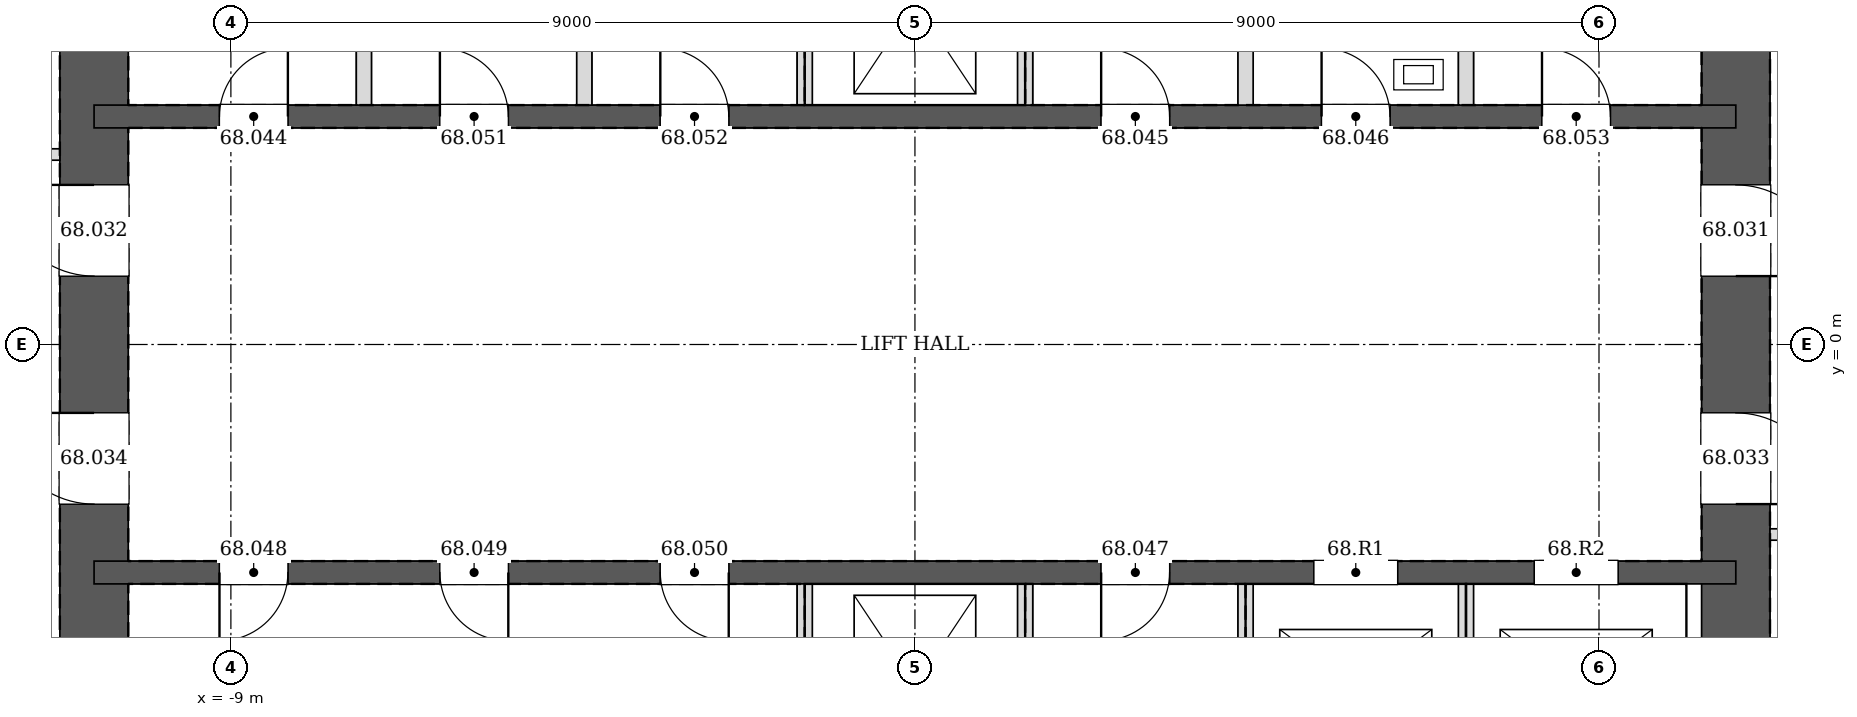
"""IFC4 building model, lengths in metres.
Left out: names, types, materials, properties, quantities, classifications, styles, units other than length and angle.
Written with IfcOpenShell. Run it as: python <this file> out.ifc"""

import sys

from ifc_helpers import new_model, si_unit, direction, frame, frame_2d, origin, place, context, subcontext, project, spatial, rectangle, extrude, element, fill, save


model = new_model("IFC4")
c1 = context("Model", 3, precision=1e-05, world=origin(), true_north=direction((0.0, 1.0)))
c2 = subcontext(c1, "Body", "Model", "MODEL_VIEW")
j1 = project(units=[si_unit("LENGTHUNIT", "METRE"), si_unit("PLANEANGLEUNIT", "RADIAN")], contexts=[c1])
p1 = place(None, origin())
s1 = spatial("IfcSite", under=j1, at=p1, CompositionType="ELEMENT")
p2 = place(p1, origin())
s2 = spatial("IfcBuilding", under=s1, at=p2, CompositionType="ELEMENT")
p3 = place(p2, frame((0.0, 0.0, 281.0)))
s3 = spatial("IfcBuildingStorey", under=s2, at=p3, CompositionType="ELEMENT", Elevation=281.0)
p4 = place(p3, frame((10.8, -10.8, 0.0), z_axis=(0.0, 0.0, 1.0), x_axis=(0.0, 1.0, 0.0)))
e1 = element("IfcWall", 1, at=p4, inside=s3, PredefinedType="SOLIDWALL", context=c2, shape_type="SweptSolid", body=[
    extrude(rectangle(XDim=21.6, YDim=0.9, at=frame_2d((10.8, 0.0))), origin(), (0.0, 0.0, 1.0), 3.4),
])
p5 = place(p4, frame((11.7, 0.0, 0.0)))
e2 = element("IfcOpeningElement", 2, at=p5, cuts=e1, PredefinedType="OPENING", context=c2, shape_type="SweptSolid", body=[
    extrude(rectangle(XDim=1.2, YDim=2.1, at=frame_2d((0.6, 1.05))), frame((0.0, 0.46, 0.0), z_axis=(0.0, -1.0, 0.0), x_axis=(1.0, 0.0, 0.0)), (0.0, 0.0, 1.0), 0.92),
])
p6 = place(p4, frame((8.7, 0.0, 0.0)))
e3 = element("IfcOpeningElement", 3, at=p6, cuts=e1, PredefinedType="OPENING", context=c2, shape_type="SweptSolid", body=[
    extrude(rectangle(XDim=1.2, YDim=2.1, at=frame_2d((0.6, 1.05))), frame((0.0, 0.46, 0.0), z_axis=(0.0, -1.0, 0.0), x_axis=(1.0, 0.0, 0.0)), (0.0, 0.0, 1.0), 0.92),
])
p7 = place(p3, frame((-10.8, 10.8, 0.0), z_axis=(0.0, 0.0, 1.0), x_axis=(0.0, -1.0, 0.0)))
e4 = element("IfcWall", 4, at=p7, inside=s3, PredefinedType="SOLIDWALL", context=c2, shape_type="SweptSolid", body=[
    extrude(rectangle(XDim=21.6, YDim=0.9, at=frame_2d((10.8, 0.0))), origin(), (0.0, 0.0, 1.0), 3.4),
])
p8 = place(p7, frame((8.7, 0.0, 0.0)))
e5 = element("IfcOpeningElement", 5, at=p8, cuts=e4, PredefinedType="OPENING", context=c2, shape_type="SweptSolid", body=[
    extrude(rectangle(XDim=1.2, YDim=2.1, at=frame_2d((0.6, 1.05))), frame((0.0, 0.46, 0.0), z_axis=(0.0, -1.0, 0.0), x_axis=(1.0, 0.0, 0.0)), (0.0, 0.0, 1.0), 0.92),
])
p9 = place(p7, frame((11.7, 0.0, 0.0)))
e6 = element("IfcOpeningElement", 6, at=p9, cuts=e4, PredefinedType="OPENING", context=c2, shape_type="SweptSolid", body=[
    extrude(rectangle(XDim=1.2, YDim=2.1, at=frame_2d((0.6, 1.05))), frame((0.0, 0.46, 0.0), z_axis=(0.0, -1.0, 0.0), x_axis=(1.0, 0.0, 0.0)), (0.0, 0.0, 1.0), 0.92),
])
p10 = place(p3, frame((-10.8, 3.0, 0.0), z_axis=(0.0, 0.0, 1.0), x_axis=(1.0, 0.0, 0.0)))
e7 = element("IfcWall", 7, at=p10, inside=s3, PredefinedType="SOLIDWALL", context=c2, shape_type="SweptSolid", body=[
    extrude(rectangle(XDim=21.6, YDim=0.3, at=frame_2d((10.8, 0.0))), origin(), (0.0, 0.0, 1.0), 3.4),
])
p11 = place(p10, frame((1.65, 0.0, 0.0)))
e8 = element("IfcOpeningElement", 8, at=p11, cuts=e7, PredefinedType="OPENING", context=c2, shape_type="SweptSolid", body=[
    extrude(rectangle(XDim=0.9, YDim=2.1, at=frame_2d((0.45, 1.05))), frame((0.0, 0.16, 0.0), z_axis=(0.0, -1.0, 0.0), x_axis=(1.0, 0.0, 0.0)), (0.0, 0.0, 1.0), 0.32),
])
p12 = place(p10, frame((13.25, 0.0, 0.0)))
e9 = element("IfcOpeningElement", 9, at=p12, cuts=e7, PredefinedType="OPENING", context=c2, shape_type="SweptSolid", body=[
    extrude(rectangle(XDim=0.9, YDim=2.1, at=frame_2d((0.45, 1.05))), frame((0.0, 0.16, 0.0), z_axis=(0.0, -1.0, 0.0), x_axis=(1.0, 0.0, 0.0)), (0.0, 0.0, 1.0), 0.32),
])
p13 = place(p10, frame((16.15, 0.0, 0.0)))
e10 = element("IfcOpeningElement", 10, at=p13, cuts=e7, PredefinedType="OPENING", context=c2, shape_type="SweptSolid", body=[
    extrude(rectangle(XDim=0.9, YDim=2.1, at=frame_2d((0.45, 1.05))), frame((0.0, 0.16, 0.0), z_axis=(0.0, -1.0, 0.0), x_axis=(1.0, 0.0, 0.0)), (0.0, 0.0, 1.0), 0.32),
])
p14 = place(p10, frame((4.55, 0.0, 0.0)))
e11 = element("IfcOpeningElement", 11, at=p14, cuts=e7, PredefinedType="OPENING", context=c2, shape_type="SweptSolid", body=[
    extrude(rectangle(XDim=0.9, YDim=2.1, at=frame_2d((0.45, 1.05))), frame((0.0, 0.16, 0.0), z_axis=(0.0, -1.0, 0.0), x_axis=(1.0, 0.0, 0.0)), (0.0, 0.0, 1.0), 0.32),
])
p15 = place(p10, frame((7.45, 0.0, 0.0)))
e12 = element("IfcOpeningElement", 12, at=p15, cuts=e7, PredefinedType="OPENING", context=c2, shape_type="SweptSolid", body=[
    extrude(rectangle(XDim=0.9, YDim=2.1, at=frame_2d((0.45, 1.05))), frame((0.0, 0.16, 0.0), z_axis=(0.0, -1.0, 0.0), x_axis=(1.0, 0.0, 0.0)), (0.0, 0.0, 1.0), 0.32),
])
p16 = place(p10, frame((19.05, 0.0, 0.0)))
e13 = element("IfcOpeningElement", 13, at=p16, cuts=e7, PredefinedType="OPENING", context=c2, shape_type="SweptSolid", body=[
    extrude(rectangle(XDim=0.9, YDim=2.1, at=frame_2d((0.45, 1.05))), frame((0.0, 0.16, 0.0), z_axis=(0.0, -1.0, 0.0), x_axis=(1.0, 0.0, 0.0)), (0.0, 0.0, 1.0), 0.32),
])
p17 = place(p3, frame((-10.8, -3.0, 0.0), z_axis=(0.0, 0.0, 1.0), x_axis=(1.0, 0.0, 0.0)))
e14 = element("IfcWall", 14, at=p17, inside=s3, PredefinedType="SOLIDWALL", context=c2, shape_type="SweptSolid", body=[
    extrude(rectangle(XDim=21.6, YDim=0.3, at=frame_2d((10.8, 0.0))), origin(), (0.0, 0.0, 1.0), 3.4),
])
p18 = place(p17, frame((13.25, 0.0, 0.0)))
e15 = element("IfcOpeningElement", 15, at=p18, cuts=e14, PredefinedType="OPENING", context=c2, shape_type="SweptSolid", body=[
    extrude(rectangle(XDim=0.9, YDim=2.1, at=frame_2d((0.45, 1.05))), frame((0.0, 0.16, 0.0), z_axis=(0.0, -1.0, 0.0), x_axis=(1.0, 0.0, 0.0)), (0.0, 0.0, 1.0), 0.32),
])
p19 = place(p17, frame((1.65, 0.0, 0.0)))
e16 = element("IfcOpeningElement", 16, at=p19, cuts=e14, PredefinedType="OPENING", context=c2, shape_type="SweptSolid", body=[
    extrude(rectangle(XDim=0.9, YDim=2.1, at=frame_2d((0.45, 1.05))), frame((0.0, 0.16, 0.0), z_axis=(0.0, -1.0, 0.0), x_axis=(1.0, 0.0, 0.0)), (0.0, 0.0, 1.0), 0.32),
])
p20 = place(p17, frame((4.55, 0.0, 0.0)))
e17 = element("IfcOpeningElement", 17, at=p20, cuts=e14, PredefinedType="OPENING", context=c2, shape_type="SweptSolid", body=[
    extrude(rectangle(XDim=0.9, YDim=2.1, at=frame_2d((0.45, 1.05))), frame((0.0, 0.16, 0.0), z_axis=(0.0, -1.0, 0.0), x_axis=(1.0, 0.0, 0.0)), (0.0, 0.0, 1.0), 0.32),
])
p21 = place(p17, frame((7.45, 0.0, 0.0)))
e18 = element("IfcOpeningElement", 18, at=p21, cuts=e14, PredefinedType="OPENING", context=c2, shape_type="SweptSolid", body=[
    extrude(rectangle(XDim=0.9, YDim=2.1, at=frame_2d((0.45, 1.05))), frame((0.0, 0.16, 0.0), z_axis=(0.0, -1.0, 0.0), x_axis=(1.0, 0.0, 0.0)), (0.0, 0.0, 1.0), 0.32),
])
p22 = place(p17, frame((16.05, 0.0, 0.0)))
e19 = element("IfcOpeningElement", 19, at=p22, cuts=e14, PredefinedType="OPENING", context=c2, shape_type="SweptSolid", body=[
    extrude(rectangle(XDim=1.1, YDim=2.1, at=frame_2d((0.55, 1.05))), frame((0.0, 0.16, 0.0), z_axis=(0.0, -1.0, 0.0), x_axis=(1.0, 0.0, 0.0)), (0.0, 0.0, 1.0), 0.32),
])
p23 = place(p17, frame((18.95, 0.0, 0.0)))
e20 = element("IfcOpeningElement", 20, at=p23, cuts=e14, PredefinedType="OPENING", context=c2, shape_type="SweptSolid", body=[
    extrude(rectangle(XDim=1.1, YDim=2.1, at=frame_2d((0.55, 1.05))), frame((0.0, 0.16, 0.0), z_axis=(0.0, -1.0, 0.0), x_axis=(1.0, 0.0, 0.0)), (0.0, 0.0, 1.0), 0.32),
])
for number, where, z_axis, x_axis in (
    (21, (11.25, -2.5, 0.0), (0.0, 0.0, 1.0), (1.0, 0.0, 0.0)),
    (22, (-11.25, 2.5, 0.0), (0.0, 0.0, 1.0), (-1.0, 0.0, 0.0)),
):
    element("IfcWall", number, at=place(p3, frame(where, z_axis=z_axis, x_axis=x_axis)), inside=s3, PredefinedType="PARTITIONING", context=c2, shape_type="SweptSolid", body=[
        extrude(rectangle(XDim=1.8, YDim=0.15, at=frame_2d((0.9, 0.0))), origin(), (0.0, 0.0, 1.0), 3.2),
    ])
for number, where, z_axis, x_axis in (
    (23, (-7.25, 3.15, 0.0), (0.0, 0.0, 1.0), (0.0, 1.0, 0.0)),
    (24, (-4.35, 3.15, 0.0), (0.0, 0.0, 1.0), (0.0, 1.0, 0.0)),
    (25, (-1.45, 3.15, 0.0), (0.0, 0.0, 1.0), (0.0, 1.0, 0.0)),
    (26, (1.45, 3.15, 0.0), (0.0, 0.0, 1.0), (0.0, 1.0, 0.0)),
    (27, (4.35, 3.15, 0.0), (0.0, 0.0, 1.0), (0.0, 1.0, 0.0)),
    (28, (7.25, 3.15, 0.0), (0.0, 0.0, 1.0), (0.0, 1.0, 0.0)),
    (29, (-1.45, -5.85, 0.0), (0.0, 0.0, 1.0), (0.0, 1.0, 0.0)),
    (30, (1.45, -5.85, 0.0), (0.0, 0.0, 1.0), (0.0, 1.0, 0.0)),
    (31, (4.35, -5.85, 0.0), (0.0, 0.0, 1.0), (0.0, 1.0, 0.0)),
):
    element("IfcWall", number, at=place(p3, frame(where, z_axis=z_axis, x_axis=x_axis)), inside=s3, PredefinedType="PARTITIONING", context=c2, shape_type="SweptSolid", body=[
        extrude(rectangle(XDim=2.7, YDim=0.2, at=frame_2d((1.35, 0.0))), origin(), (0.0, 0.0, 1.0), 3.2),
    ])
p24 = place(p3, frame((7.25, -5.85, 0.0), z_axis=(0.0, 0.0, 1.0), x_axis=(0.0, 1.0, 0.0)))
e32 = element("IfcWall", 32, at=p24, inside=s3, PredefinedType="PARTITIONING", context=c2, shape_type="SweptSolid", body=[
    extrude(rectangle(XDim=2.7, YDim=0.2, at=frame_2d((1.35, 0.0))), origin(), (0.0, 0.0, 1.0), 3.4),
])
p25 = place(p5, frame((1.2, 0.0, 0.0), z_axis=(0.0, 0.0, 1.0), x_axis=(-1.0, 0.0, 0.0)))
e33 = element("IfcDoor", 33, at=p25, inside=s3, OperationType="SINGLE_SWING_RIGHT", PredefinedType="DOOR", context=c2, shape_type="SweptSolid", body=[
    extrude(rectangle(XDim=1.2, YDim=2.1, at=frame_2d((0.6, 1.05))), frame((0.0, 0.025, 0.0), z_axis=(0.0, -1.0, 0.0), x_axis=(1.0, 0.0, 0.0)), (0.0, 0.0, 1.0), 0.05),
])
fill(e2, e33)
p26 = place(p8, frame((1.2, 0.0, 0.0), z_axis=(0.0, 0.0, 1.0), x_axis=(-1.0, 0.0, 0.0)))
e34 = element("IfcDoor", 34, at=p26, inside=s3, OperationType="SINGLE_SWING_RIGHT", PredefinedType="DOOR", context=c2, shape_type="SweptSolid", body=[
    extrude(rectangle(XDim=1.2, YDim=2.1, at=frame_2d((0.6, 1.05))), frame((0.0, 0.025, 0.0), z_axis=(0.0, -1.0, 0.0), x_axis=(1.0, 0.0, 0.0)), (0.0, 0.0, 1.0), 0.05),
])
fill(e5, e34)
p27 = place(p6, frame((1.2, 0.0, 0.0), z_axis=(0.0, 0.0, 1.0), x_axis=(-1.0, 0.0, 0.0)))
e35 = element("IfcDoor", 35, at=p27, inside=s3, OperationType="SINGLE_SWING_RIGHT", PredefinedType="DOOR", context=c2, shape_type="SweptSolid", body=[
    extrude(rectangle(XDim=1.2, YDim=2.1, at=frame_2d((0.6, 1.05))), frame((0.0, 0.025, 0.0), z_axis=(0.0, -1.0, 0.0), x_axis=(1.0, 0.0, 0.0)), (0.0, 0.0, 1.0), 0.05),
])
fill(e3, e35)
p28 = place(p9, frame((1.2, 0.0, 0.0), z_axis=(0.0, 0.0, 1.0), x_axis=(-1.0, 0.0, 0.0)))
e36 = element("IfcDoor", 36, at=p28, inside=s3, OperationType="SINGLE_SWING_RIGHT", PredefinedType="DOOR", context=c2, shape_type="SweptSolid", body=[
    extrude(rectangle(XDim=1.2, YDim=2.1, at=frame_2d((0.6, 1.05))), frame((0.0, 0.025, 0.0), z_axis=(0.0, -1.0, 0.0), x_axis=(1.0, 0.0, 0.0)), (0.0, 0.0, 1.0), 0.05),
])
fill(e6, e36)
p29 = place(p11, origin())
e37 = element("IfcDoor", 37, at=p29, inside=s3, OperationType="SINGLE_SWING_RIGHT", PredefinedType="DOOR", context=c2, shape_type="SweptSolid", body=[
    extrude(rectangle(XDim=0.9, YDim=2.1, at=frame_2d((0.45, 1.05))), frame((0.0, 0.025, 0.0), z_axis=(0.0, -1.0, 0.0), x_axis=(1.0, 0.0, 0.0)), (0.0, 0.0, 1.0), 0.05),
])
fill(e8, e37)
p30 = place(p12, origin())
e38 = element("IfcDoor", 38, at=p30, inside=s3, OperationType="SINGLE_SWING_LEFT", PredefinedType="DOOR", context=c2, shape_type="SweptSolid", body=[
    extrude(rectangle(XDim=0.9, YDim=2.1, at=frame_2d((0.45, 1.05))), frame((0.0, 0.025, 0.0), z_axis=(0.0, -1.0, 0.0), x_axis=(1.0, 0.0, 0.0)), (0.0, 0.0, 1.0), 0.05),
])
fill(e9, e38)
p31 = place(p13, origin())
e39 = element("IfcDoor", 39, at=p31, inside=s3, OperationType="SINGLE_SWING_LEFT", PredefinedType="DOOR", context=c2, shape_type="SweptSolid", body=[
    extrude(rectangle(XDim=0.9, YDim=2.1, at=frame_2d((0.45, 1.05))), frame((0.0, 0.025, 0.0), z_axis=(0.0, -1.0, 0.0), x_axis=(1.0, 0.0, 0.0)), (0.0, 0.0, 1.0), 0.05),
])
fill(e10, e39)
p32 = place(p18, frame((0.9, 0.0, 0.0), z_axis=(0.0, 0.0, 1.0), x_axis=(-1.0, 0.0, 0.0)))
e40 = element("IfcDoor", 40, at=p32, inside=s3, OperationType="SINGLE_SWING_RIGHT", PredefinedType="DOOR", context=c2, shape_type="SweptSolid", body=[
    extrude(rectangle(XDim=0.9, YDim=2.1, at=frame_2d((0.45, 1.05))), frame((0.0, 0.025, 0.0), z_axis=(0.0, -1.0, 0.0), x_axis=(1.0, 0.0, 0.0)), (0.0, 0.0, 1.0), 0.05),
])
fill(e15, e40)
p33 = place(p19, frame((0.9, 0.0, 0.0), z_axis=(0.0, 0.0, 1.0), x_axis=(-1.0, 0.0, 0.0)))
e41 = element("IfcDoor", 41, at=p33, inside=s3, OperationType="SINGLE_SWING_RIGHT", PredefinedType="DOOR", context=c2, shape_type="SweptSolid", body=[
    extrude(rectangle(XDim=0.9, YDim=2.1, at=frame_2d((0.45, 1.05))), frame((0.0, 0.025, 0.0), z_axis=(0.0, -1.0, 0.0), x_axis=(1.0, 0.0, 0.0)), (0.0, 0.0, 1.0), 0.05),
])
fill(e16, e41)
p34 = place(p20, frame((0.9, 0.0, 0.0), z_axis=(0.0, 0.0, 1.0), x_axis=(-1.0, 0.0, 0.0)))
e42 = element("IfcDoor", 42, at=p34, inside=s3, OperationType="SINGLE_SWING_LEFT", PredefinedType="DOOR", context=c2, shape_type="SweptSolid", body=[
    extrude(rectangle(XDim=0.9, YDim=2.1, at=frame_2d((0.45, 1.05))), frame((0.0, 0.025, 0.0), z_axis=(0.0, -1.0, 0.0), x_axis=(1.0, 0.0, 0.0)), (0.0, 0.0, 1.0), 0.05),
])
fill(e17, e42)
p35 = place(p21, frame((0.9, 0.0, 0.0), z_axis=(0.0, 0.0, 1.0), x_axis=(-1.0, 0.0, 0.0)))
e43 = element("IfcDoor", 43, at=p35, inside=s3, OperationType="SINGLE_SWING_LEFT", PredefinedType="DOOR", context=c2, shape_type="SweptSolid", body=[
    extrude(rectangle(XDim=0.9, YDim=2.1, at=frame_2d((0.45, 1.05))), frame((0.0, 0.025, 0.0), z_axis=(0.0, -1.0, 0.0), x_axis=(1.0, 0.0, 0.0)), (0.0, 0.0, 1.0), 0.05),
])
fill(e18, e43)
p36 = place(p14, origin())
e44 = element("IfcDoor", 44, at=p36, inside=s3, OperationType="SINGLE_SWING_LEFT", PredefinedType="DOOR", context=c2, shape_type="SweptSolid", body=[
    extrude(rectangle(XDim=0.9, YDim=2.1, at=frame_2d((0.45, 1.05))), frame((0.0, 0.025, 0.0), z_axis=(0.0, -1.0, 0.0), x_axis=(1.0, 0.0, 0.0)), (0.0, 0.0, 1.0), 0.05),
])
fill(e11, e44)
p37 = place(p15, origin())
e45 = element("IfcDoor", 45, at=p37, inside=s3, OperationType="SINGLE_SWING_LEFT", PredefinedType="DOOR", context=c2, shape_type="SweptSolid", body=[
    extrude(rectangle(XDim=0.9, YDim=2.1, at=frame_2d((0.45, 1.05))), frame((0.0, 0.025, 0.0), z_axis=(0.0, -1.0, 0.0), x_axis=(1.0, 0.0, 0.0)), (0.0, 0.0, 1.0), 0.05),
])
fill(e12, e45)
p38 = place(p16, origin())
e46 = element("IfcDoor", 46, at=p38, inside=s3, OperationType="SINGLE_SWING_LEFT", PredefinedType="DOOR", context=c2, shape_type="SweptSolid", body=[
    extrude(rectangle(XDim=0.9, YDim=2.1, at=frame_2d((0.45, 1.05))), frame((0.0, 0.025, 0.0), z_axis=(0.0, -1.0, 0.0), x_axis=(1.0, 0.0, 0.0)), (0.0, 0.0, 1.0), 0.05),
])
fill(e13, e46)
p39 = place(p22, origin())
e47 = element("IfcDoor", 47, at=p39, inside=s3, OperationType="DOUBLE_DOOR_SLIDING", PredefinedType="DOOR", context=c2, shape_type="SweptSolid", body=[
    extrude(rectangle(XDim=1.1, YDim=2.1, at=frame_2d((0.55, 1.05))), frame((0.0, 0.025, 0.0), z_axis=(0.0, -1.0, 0.0), x_axis=(1.0, 0.0, 0.0)), (0.0, 0.0, 1.0), 0.05),
])
fill(e19, e47)
p40 = place(p23, origin())
e48 = element("IfcDoor", 48, at=p40, inside=s3, OperationType="DOUBLE_DOOR_SLIDING", PredefinedType="DOOR", context=c2, shape_type="SweptSolid", body=[
    extrude(rectangle(XDim=1.1, YDim=2.1, at=frame_2d((0.55, 1.05))), frame((0.0, 0.025, 0.0), z_axis=(0.0, -1.0, 0.0), x_axis=(1.0, 0.0, 0.0)), (0.0, 0.0, 1.0), 0.05),
])
fill(e20, e48)
save(model, sys.argv[1])
